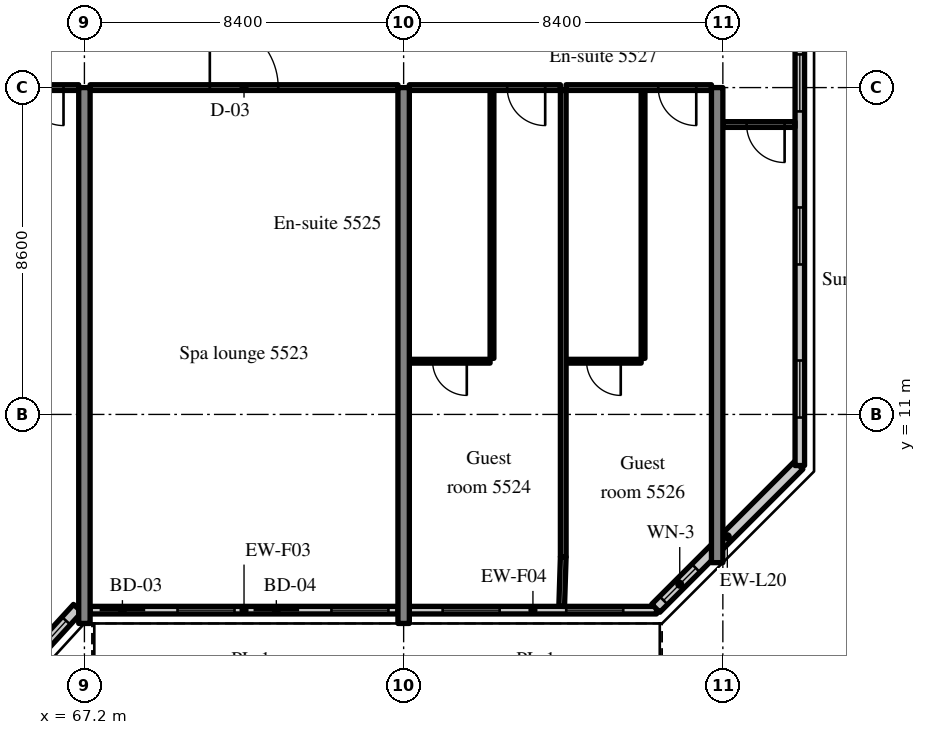
"""IFC4 building model, lengths in metres.
Left out: names, types, materials, properties, quantities, classifications, styles, units other than length and angle.
Written with IfcOpenShell. Run it as: python <this file> out.ifc"""

import sys

from ifc_helpers import new_model, si_unit, direction, frame, frame_2d, origin, place, context, subcontext, project, spatial, rectangle, extrude, source, transform, mapped, element, fill, save


model = new_model("IFC4")
c1 = context("Model", 3, precision=1e-05, world=origin(), true_north=direction((0.0, 1.0)))
c2 = subcontext(c1, "Body", "Model", "MODEL_VIEW")
j1 = project(units=[si_unit("LENGTHUNIT", "METRE"), si_unit("PLANEANGLEUNIT", "RADIAN")], contexts=[c1])
p1 = place(None, origin())
s1 = spatial("IfcSite", under=j1, at=p1, CompositionType="ELEMENT")
p2 = place(p1, origin())
s2 = spatial("IfcBuilding", under=s1, at=p2, CompositionType="ELEMENT")
p3 = place(p2, frame((0.0, 0.0, 229.6)))
s3 = spatial("IfcBuildingStorey", under=s2, at=p3, CompositionType="ELEMENT", Elevation=229.6)
m1 = source(origin(), c2, "Body", "SweptSolid", [
    extrude(rectangle(XDim=14.1, YDim=0.3, at=frame_2d((7.05, 0.0))), origin(), (0.0, 0.0, 1.0), 3.62),
])
for number, where, z_axis, x_axis in (
    (1, (67.2, 5.5, 0.0), (0.0, 0.0, 1.0), (0.0, 1.0, 0.0)),
    (2, (75.6, 5.5, 0.0), (0.0, 0.0, 1.0), (0.0, 1.0, 0.0)),
):
    element("IfcWall", number, at=place(p3, frame(where, z_axis=z_axis, x_axis=x_axis)), inside=s3, PredefinedType="SHEAR", context=c2, shape_type="MappedRepresentation", body=[
        mapped(m1, transform((0.0, 0.0, 0.0), scale=1.0)),
    ])
m2 = source(origin(), c2, "Body", "SweptSolid", [
    extrude(rectangle(XDim=12.5, YDim=0.3, at=frame_2d((6.25, 0.0))), origin(), (0.0, 0.0, 1.0), 3.62),
])
p4 = place(p3, frame((83.85, 7.1, 0.0), z_axis=(0.0, 0.0, 1.0), x_axis=(0.0, 1.0, 0.0)))
e3 = element("IfcWall", 3, at=p4, inside=s3, PredefinedType="SHEAR", context=c2, shape_type="MappedRepresentation", body=[
    mapped(m2, transform((0.0, 0.0, 0.0), scale=1.0)),
])
m3 = source(origin(), c2, "Body", "SweptSolid", [
    extrude(rectangle(XDim=2.398, YDim=0.3, at=frame_2d((1.199, 0.0))), origin(), (0.0, 0.0, 1.0), 3.62),
])
p5 = place(p3, frame((65.404, 4.131, 0.0), z_axis=(0.0, 0.0, 1.0), x_axis=(0.675374189419, 0.737475222815, 0.0)))
e4 = element("IfcWall", 4, at=p5, inside=s3, PredefinedType="SOLIDWALL", context=c2, shape_type="MappedRepresentation", body=[
    mapped(m3, transform((0.0, 0.0, 0.0), scale=1.0)),
])
m4 = source(origin(), c2, "Body", "SweptSolid", [
    extrude(rectangle(XDim=1.5, YDim=2.0, at=frame_2d((0.75, 1.0))), frame((0.0, 0.16, 0.0), z_axis=(0.0, -1.0, 0.0), x_axis=(1.0, 0.0, 0.0)), (0.0, 0.0, 1.0), 0.32),
])
p6 = place(p5, frame((0.449, 0.0, 0.9)))
e5 = element("IfcOpeningElement", 5, at=p6, cuts=e4, PredefinedType="OPENING", context=c2, shape_type="MappedRepresentation", body=[
    mapped(m4, transform((0.0, 0.0, 0.0), scale=1.0)),
])
m5 = source(origin(), c2, "Body", "SweptSolid", [
    extrude(rectangle(XDim=8.1, YDim=0.2, at=frame_2d((4.05, 0.0))), origin(), (0.0, 0.0, 1.0), 3.02),
])
p7 = place(p3, frame((67.35, 5.85, 0.0), z_axis=(0.0, 0.0, 1.0), x_axis=(1.0, 0.0, 0.0)))
e6 = element("IfcWall", 6, at=p7, inside=s3, PredefinedType="SOLIDWALL", context=c2, shape_type="MappedRepresentation", body=[
    mapped(m5, transform((0.0, 0.0, 0.0), scale=1.0)),
])
m6 = source(origin(), c2, "Body", "SweptSolid", [
    extrude(rectangle(XDim=1.2, YDim=2.4, at=frame_2d((0.6, 1.2))), frame((0.0, 0.11, 0.0), z_axis=(0.0, -1.0, 0.0), x_axis=(1.0, 0.0, 0.0)), (0.0, 0.0, 1.0), 0.22),
])
p8 = place(p7, frame((0.25, 0.0, 0.0)))
e7 = element("IfcOpeningElement", 7, at=p8, cuts=e6, PredefinedType="OPENING", context=c2, shape_type="MappedRepresentation", body=[
    mapped(m6, transform((0.0, 0.0, 0.0), scale=1.0)),
])
m7 = source(origin(), c2, "Body", "SweptSolid", [
    extrude(rectangle(XDim=1.5, YDim=1.5, at=frame_2d((0.75, 0.75))), frame((0.0, 0.11, 0.0), z_axis=(0.0, -1.0, 0.0), x_axis=(1.0, 0.0, 0.0)), (0.0, 0.0, 1.0), 0.22),
])
p9 = place(p7, frame((2.3, 0.0, 0.9)))
e8 = element("IfcOpeningElement", 8, at=p9, cuts=e6, PredefinedType="OPENING", context=c2, shape_type="MappedRepresentation", body=[
    mapped(m7, transform((0.0, 0.0, 0.0), scale=1.0)),
])
p10 = place(p7, frame((4.3, 0.0, 0.0)))
e9 = element("IfcOpeningElement", 9, at=p10, cuts=e6, PredefinedType="OPENING", context=c2, shape_type="MappedRepresentation", body=[
    mapped(m6, transform((0.0, 0.0, 0.0), scale=1.0)),
])
p11 = place(p7, frame((6.35, 0.0, 0.9)))
e10 = element("IfcOpeningElement", 10, at=p11, cuts=e6, PredefinedType="OPENING", context=c2, shape_type="MappedRepresentation", body=[
    mapped(m7, transform((0.0, 0.0, 0.0), scale=1.0)),
])
m8 = source(origin(), c2, "Body", "SweptSolid", [
    extrude(rectangle(XDim=6.505, YDim=0.2, at=frame_2d((3.252, 0.0))), origin(), (0.0, 0.0, 1.0), 3.02),
])
p12 = place(p3, frame((75.75, 5.85, 0.0), z_axis=(0.0, 0.0, 1.0), x_axis=(1.0, 0.0, 0.0)))
e11 = element("IfcWall", 11, at=p12, inside=s3, PredefinedType="SOLIDWALL", context=c2, shape_type="MappedRepresentation", body=[
    mapped(m8, transform((0.0, 0.0, 0.0), scale=1.0)),
])
p13 = place(p12, frame((0.876, 0.0, 0.9)))
e12 = element("IfcOpeningElement", 12, at=p13, cuts=e11, PredefinedType="OPENING", context=c2, shape_type="MappedRepresentation", body=[
    mapped(m7, transform((0.0, 0.0, 0.0), scale=1.0)),
])
p14 = place(p12, frame((4.129, 0.0, 0.9)))
e13 = element("IfcOpeningElement", 13, at=p14, cuts=e11, PredefinedType="OPENING", context=c2, shape_type="MappedRepresentation", body=[
    mapped(m7, transform((0.0, 0.0, 0.0), scale=1.0)),
])
m9 = source(origin(), c2, "Body", "SweptSolid", [
    extrude(rectangle(XDim=5.326, YDim=0.3, at=frame_2d((2.663, 0.0))), origin(), (0.0, 0.0, 1.0), 3.62),
])
p15 = place(p3, frame((82.234, 5.9, 0.0), z_axis=(0.0, 0.0, 1.0), x_axis=(0.707083859269, 0.707129702361, 0.0)))
e14 = element("IfcWall", 14, at=p15, inside=s3, PredefinedType="SOLIDWALL", context=c2, shape_type="MappedRepresentation", body=[
    mapped(m9, transform((0.0, 0.0, 0.0), scale=1.0)),
])
m10 = source(origin(), c2, "Body", "SweptSolid", [
    extrude(rectangle(XDim=1.2, YDim=1.5, at=frame_2d((0.6, 0.75))), frame((0.0, 0.16, 0.0), z_axis=(0.0, -1.0, 0.0), x_axis=(1.0, 0.0, 0.0)), (0.0, 0.0, 1.0), 0.32),
])
p16 = place(p15, frame((0.292, 0.0, 0.9)))
e15 = element("IfcOpeningElement", 15, at=p16, cuts=e14, PredefinedType="OPENING", context=c2, shape_type="MappedRepresentation", body=[
    mapped(m10, transform((0.0, 0.0, 0.0), scale=1.0)),
])
m11 = source(origin(), c2, "Body", "SweptSolid", [
    extrude(rectangle(XDim=28.189, YDim=0.25, at=frame_2d((14.095, 0.0))), origin(), (0.0, 0.0, 1.0), 3.62),
])
p17 = place(p3, frame((86.025, 9.655, 0.0), z_axis=(0.0, 0.0, 1.0), x_axis=(0.0, 1.0, 0.0)))
e16 = element("IfcWall", 16, at=p17, inside=s3, PredefinedType="SOLIDWALL", context=c2, shape_type="MappedRepresentation", body=[
    mapped(m11, transform((0.0, 0.0, 0.0), scale=1.0)),
])
m12 = source(origin(), c2, "Body", "SweptSolid", [
    extrude(rectangle(XDim=1.5, YDim=1.5, at=frame_2d((0.75, 0.75))), frame((0.0, 0.135, 0.0), z_axis=(0.0, -1.0, 0.0), x_axis=(1.0, 0.0, 0.0)), (0.0, 0.0, 1.0), 0.27),
])
p18 = place(p17, frame((1.263, 0.0, 0.9)))
e17 = element("IfcOpeningElement", 17, at=p18, cuts=e16, PredefinedType="OPENING", context=c2, shape_type="MappedRepresentation", body=[
    mapped(m12, transform((0.0, 0.0, 0.0), scale=1.0)),
])
p19 = place(p17, frame((5.291, 0.0, 0.9)))
e18 = element("IfcOpeningElement", 18, at=p19, cuts=e16, PredefinedType="OPENING", context=c2, shape_type="MappedRepresentation", body=[
    mapped(m12, transform((0.0, 0.0, 0.0), scale=1.0)),
])
p20 = place(p17, frame((9.318, 0.0, 0.9)))
e19 = element("IfcOpeningElement", 19, at=p20, cuts=e16, PredefinedType="OPENING", context=c2, shape_type="MappedRepresentation", body=[
    mapped(m12, transform((0.0, 0.0, 0.0), scale=1.0)),
])
p21 = place(p17, frame((13.345, 0.0, 0.9)))
e20 = element("IfcOpeningElement", 20, at=p21, cuts=e16, PredefinedType="OPENING", context=c2, shape_type="MappedRepresentation", body=[
    mapped(m12, transform((0.0, 0.0, 0.0), scale=1.0)),
])
p22 = place(p17, frame((17.372, 0.0, 0.9)))
e21 = element("IfcOpeningElement", 21, at=p22, cuts=e16, PredefinedType="OPENING", context=c2, shape_type="MappedRepresentation", body=[
    mapped(m12, transform((0.0, 0.0, 0.0), scale=1.0)),
])
p23 = place(p17, frame((21.399, 0.0, 0.9)))
e22 = element("IfcOpeningElement", 22, at=p23, cuts=e16, PredefinedType="OPENING", context=c2, shape_type="MappedRepresentation", body=[
    mapped(m12, transform((0.0, 0.0, 0.0), scale=1.0)),
])
p24 = place(p17, frame((25.426, 0.0, 0.9)))
e23 = element("IfcOpeningElement", 23, at=p24, cuts=e16, PredefinedType="OPENING", context=c2, shape_type="MappedRepresentation", body=[
    mapped(m12, transform((0.0, 0.0, 0.0), scale=1.0)),
])
m13 = source(origin(), c2, "Body", "SweptSolid", [
    extrude(rectangle(XDim=8.1, YDim=0.15, at=frame_2d((4.05, 0.0))), origin(), (0.0, 0.0, 1.0), 2.92),
])
p25 = place(p3, frame((58.95, 19.6, 0.0), z_axis=(0.0, 0.0, 1.0), x_axis=(1.0, 0.0, 0.0)))
e24 = element("IfcWall", 24, at=p25, inside=s3, PredefinedType="PARTITIONING", context=c2, shape_type="MappedRepresentation", body=[
    mapped(m13, transform((0.0, 0.0, 0.0), scale=1.0)),
])
m14 = source(origin(), c2, "Body", "SweptSolid", [
    extrude(rectangle(XDim=1.0, YDim=2.1, at=frame_2d((0.5, 1.05))), frame((0.0, 0.085, 0.0), z_axis=(0.0, -1.0, 0.0), x_axis=(1.0, 0.0, 0.0)), (0.0, 0.0, 1.0), 0.17),
])
p26 = place(p25, frame((6.7, 0.0, 0.0)))
e25 = element("IfcOpeningElement", 25, at=p26, cuts=e24, PredefinedType="OPENING", context=c2, shape_type="MappedRepresentation", body=[
    mapped(m14, transform((0.0, 0.0, 0.0), scale=1.0)),
])
m15 = source(origin(), c2, "Body", "SweptSolid", [
    extrude(rectangle(XDim=8.1, YDim=0.15, at=frame_2d((4.05, 0.0))), origin(), (0.0, 0.0, 1.0), 2.92),
])
p27 = place(p3, frame((67.35, 19.6, 0.0), z_axis=(0.0, 0.0, 1.0), x_axis=(1.0, 0.0, 0.0)))
e26 = element("IfcWall", 26, at=p27, inside=s3, PredefinedType="PARTITIONING", context=c2, shape_type="MappedRepresentation", body=[
    mapped(m15, transform((0.0, 0.0, 0.0), scale=1.0)),
])
m16 = source(origin(), c2, "Body", "SweptSolid", [
    extrude(rectangle(XDim=1.8, YDim=2.1, at=frame_2d((0.9, 1.05))), frame((0.0, 0.085, 0.0), z_axis=(0.0, -1.0, 0.0), x_axis=(1.0, 0.0, 0.0)), (0.0, 0.0, 1.0), 0.17),
])
p28 = place(p27, frame((3.15, 0.0, 0.0)))
e27 = element("IfcOpeningElement", 27, at=p28, cuts=e26, PredefinedType="OPENING", context=c2, shape_type="MappedRepresentation", body=[
    mapped(m16, transform((0.0, 0.0, 0.0), scale=1.0)),
])
m17 = source(origin(), c2, "Body", "SweptSolid", [
    extrude(rectangle(XDim=7.05, YDim=0.1, at=frame_2d((3.525, 0.0))), origin(), (0.0, 0.0, 1.0), 3.62),
])
p29 = place(p3, frame((77.925, 12.475, 0.0), z_axis=(0.0, 0.0, 1.0), x_axis=(0.0, 1.0, 0.0)))
e28 = element("IfcWall", 28, at=p29, inside=s3, PredefinedType="PARTITIONING", context=c2, shape_type="MappedRepresentation", body=[
    mapped(m17, transform((0.0, 0.0, 0.0), scale=1.0)),
])
m18 = source(origin(), c2, "Body", "SweptSolid", [
    extrude(rectangle(XDim=2.125, YDim=0.1, at=frame_2d((1.062, 0.0))), origin(), (0.0, 0.0, 1.0), 3.62),
])
p30 = place(p3, frame((75.75, 12.4, 0.0), z_axis=(0.0, 0.0, 1.0), x_axis=(1.0, 0.0, 0.0)))
e29 = element("IfcWall", 29, at=p30, inside=s3, PredefinedType="PARTITIONING", context=c2, shape_type="MappedRepresentation", body=[
    mapped(m18, transform((0.0, 0.0, 0.0), scale=1.0)),
])
m19 = source(origin(), c2, "Body", "SweptSolid", [
    extrude(rectangle(XDim=0.9, YDim=2.1, at=frame_2d((0.45, 1.05))), frame((0.0, 0.06, 0.0), z_axis=(0.0, -1.0, 0.0), x_axis=(1.0, 0.0, 0.0)), (0.0, 0.0, 1.0), 0.12),
])
p31 = place(p30, frame((0.612, 0.0, 0.0)))
e30 = element("IfcOpeningElement", 30, at=p31, cuts=e29, PredefinedType="OPENING", context=c2, shape_type="MappedRepresentation", body=[
    mapped(m19, transform((0.0, 0.0, 0.0), scale=1.0)),
])
m20 = source(origin(), c2, "Body", "SweptSolid", [
    extrude(rectangle(XDim=3.975, YDim=0.15, at=frame_2d((1.988, 0.0))), origin(), (0.0, 0.0, 1.0), 2.92),
])
p32 = place(p3, frame((75.75, 19.6, 0.0), z_axis=(0.0, 0.0, 1.0), x_axis=(1.0, 0.0, 0.0)))
e31 = element("IfcWall", 31, at=p32, inside=s3, PredefinedType="PARTITIONING", context=c2, shape_type="MappedRepresentation", body=[
    mapped(m20, transform((0.0, 0.0, 0.0), scale=1.0)),
])
p33 = place(p32, frame((2.575, 0.0, 0.0)))
e32 = element("IfcOpeningElement", 32, at=p33, cuts=e31, PredefinedType="OPENING", context=c2, shape_type="MappedRepresentation", body=[
    mapped(m14, transform((0.0, 0.0, 0.0), scale=1.0)),
])
p34 = place(p3, frame((81.9, 12.475, 0.0), z_axis=(0.0, 0.0, 1.0), x_axis=(0.0, 1.0, 0.0)))
e33 = element("IfcWall", 33, at=p34, inside=s3, PredefinedType="PARTITIONING", context=c2, shape_type="MappedRepresentation", body=[
    mapped(m17, transform((0.0, 0.0, 0.0), scale=1.0)),
])
m21 = source(origin(), c2, "Body", "SweptSolid", [
    extrude(rectangle(XDim=1.975, YDim=0.1, at=frame_2d((0.988, 0.0))), origin(), (0.0, 0.0, 1.0), 3.62),
])
p35 = place(p3, frame((79.875, 12.4, 0.0), z_axis=(0.0, 0.0, 1.0), x_axis=(1.0, 0.0, 0.0)))
e34 = element("IfcWall", 34, at=p35, inside=s3, PredefinedType="PARTITIONING", context=c2, shape_type="MappedRepresentation", body=[
    mapped(m21, transform((0.0, 0.0, 0.0), scale=1.0)),
])
p36 = place(p35, frame((0.538, 0.0, 0.0)))
e35 = element("IfcOpeningElement", 35, at=p36, cuts=e34, PredefinedType="OPENING", context=c2, shape_type="MappedRepresentation", body=[
    mapped(m19, transform((0.0, 0.0, 0.0), scale=1.0)),
])
m22 = source(origin(), c2, "Body", "SweptSolid", [
    extrude(rectangle(XDim=3.825, YDim=0.15, at=frame_2d((1.913, 0.0))), origin(), (0.0, 0.0, 1.0), 2.92),
])
p37 = place(p3, frame((79.875, 19.6, 0.0), z_axis=(0.0, 0.0, 1.0), x_axis=(1.0, 0.0, 0.0)))
e36 = element("IfcWall", 36, at=p37, inside=s3, PredefinedType="PARTITIONING", context=c2, shape_type="MappedRepresentation", body=[
    mapped(m22, transform((0.0, 0.0, 0.0), scale=1.0)),
])
p38 = place(p37, frame((2.425, 0.0, 0.0)))
e37 = element("IfcOpeningElement", 37, at=p38, cuts=e36, PredefinedType="OPENING", context=c2, shape_type="MappedRepresentation", body=[
    mapped(m14, transform((0.0, 0.0, 0.0), scale=1.0)),
])
m23 = source(origin(), c2, "Body", "SweptSolid", [
    extrude(rectangle(XDim=12.275, YDim=0.15, at=frame_2d((6.137, 0.0))), origin(), (0.0, 0.0, 1.0), 3.62),
])
p39 = place(p3, frame((79.8, 7.25, 0.0), z_axis=(0.0, 0.0, 1.0), x_axis=(0.0, 1.0, 0.0)))
e38 = element("IfcWall", 38, at=p39, inside=s3, PredefinedType="PARTITIONING", context=c2, shape_type="MappedRepresentation", body=[
    mapped(m23, transform((0.0, 0.0, 0.0), scale=1.0)),
])
m24 = source(origin(), c2, "Body", "SweptSolid", [
    extrude(rectangle(XDim=1.9, YDim=0.15, at=frame_2d((0.95, 0.0))), origin(), (0.0, 0.0, 1.0), 2.92),
])
p40 = place(p3, frame((84.0, 18.628, 0.0), z_axis=(0.0, 0.0, 1.0), x_axis=(1.0, 0.0, 0.0)))
e39 = element("IfcWall", 39, at=p40, inside=s3, PredefinedType="PARTITIONING", context=c2, shape_type="MappedRepresentation", body=[
    mapped(m24, transform((0.0, 0.0, 0.0), scale=1.0)),
])
p41 = place(p40, frame((0.625, 0.0, 0.0)))
e40 = element("IfcOpeningElement", 40, at=p41, cuts=e39, PredefinedType="OPENING", context=c2, shape_type="MappedRepresentation", body=[
    mapped(m14, transform((0.0, 0.0, 0.0), scale=1.0)),
])
m25 = source(origin(), c2, "Body", "SweptSolid", [
    extrude(rectangle(XDim=1.301, YDim=0.15, at=frame_2d((0.65, 0.0))), origin(), (0.0, 0.0, 1.0), 3.62),
])
p42 = place(p3, frame((79.759, 5.95, 0.0), z_axis=(0.0, 0.0, 1.0), x_axis=(0.031533606063, 0.999502692187, 0.0)))
e41 = element("IfcWall", 41, at=p42, inside=s3, PredefinedType="PARTITIONING", context=c2, shape_type="MappedRepresentation", body=[
    mapped(m25, transform((0.0, 0.0, 0.0), scale=1.0)),
])
m26 = source(origin(), c2, "Body", "SweptSolid", [
    extrude(rectangle(XDim=1.5, YDim=2.0, at=frame_2d((0.75, 1.0))), frame((0.0, 0.03, 0.0), z_axis=(0.0, -1.0, 0.0), x_axis=(1.0, 0.0, 0.0)), (0.0, 0.0, 1.0), 0.06),
])
p43 = place(p6, origin())
e42 = element("IfcWindow", 42, at=p43, inside=s3, PartitioningType="SINGLE_PANEL", PredefinedType="WINDOW", context=c2, shape_type="MappedRepresentation", body=[
    mapped(m26, transform((0.0, 0.0, 0.0), scale=1.0)),
])
fill(e5, e42)
m27 = source(origin(), c2, "Body", "SweptSolid", [
    extrude(rectangle(XDim=1.2, YDim=2.4, at=frame_2d((0.6, 1.2))), frame((0.0, 0.025, 0.0), z_axis=(0.0, -1.0, 0.0), x_axis=(1.0, 0.0, 0.0)), (0.0, 0.0, 1.0), 0.05),
])
p44 = place(p8, origin())
e43 = element("IfcDoor", 43, at=p44, inside=s3, OperationType="SLIDING_TO_LEFT", PredefinedType="DOOR", context=c2, shape_type="MappedRepresentation", body=[
    mapped(m27, transform((0.0, 0.0, 0.0), scale=1.0)),
])
fill(e7, e43)
m28 = source(origin(), c2, "Body", "SweptSolid", [
    extrude(rectangle(XDim=1.5, YDim=1.5, at=frame_2d((0.75, 0.75))), frame((0.0, 0.03, 0.0), z_axis=(0.0, -1.0, 0.0), x_axis=(1.0, 0.0, 0.0)), (0.0, 0.0, 1.0), 0.06),
])
p45 = place(p9, origin())
e44 = element("IfcWindow", 44, at=p45, inside=s3, PartitioningType="SINGLE_PANEL", PredefinedType="WINDOW", context=c2, shape_type="MappedRepresentation", body=[
    mapped(m28, transform((0.0, 0.0, 0.0), scale=1.0)),
])
fill(e8, e44)
p46 = place(p10, origin())
e45 = element("IfcDoor", 45, at=p46, inside=s3, OperationType="SLIDING_TO_RIGHT", PredefinedType="DOOR", context=c2, shape_type="MappedRepresentation", body=[
    mapped(m27, transform((0.0, 0.0, 0.0), scale=1.0)),
])
fill(e9, e45)
p47 = place(p11, origin())
e46 = element("IfcWindow", 46, at=p47, inside=s3, PartitioningType="SINGLE_PANEL", PredefinedType="WINDOW", context=c2, shape_type="MappedRepresentation", body=[
    mapped(m28, transform((0.0, 0.0, 0.0), scale=1.0)),
])
fill(e10, e46)
p48 = place(p13, origin())
e47 = element("IfcWindow", 47, at=p48, inside=s3, PartitioningType="SINGLE_PANEL", PredefinedType="WINDOW", context=c2, shape_type="MappedRepresentation", body=[
    mapped(m28, transform((0.0, 0.0, 0.0), scale=1.0)),
])
fill(e12, e47)
p49 = place(p14, origin())
e48 = element("IfcWindow", 48, at=p49, inside=s3, PartitioningType="SINGLE_PANEL", PredefinedType="WINDOW", context=c2, shape_type="MappedRepresentation", body=[
    mapped(m28, transform((0.0, 0.0, 0.0), scale=1.0)),
])
fill(e13, e48)
m29 = source(origin(), c2, "Body", "SweptSolid", [
    extrude(rectangle(XDim=1.2, YDim=1.5, at=frame_2d((0.6, 0.75))), frame((0.0, 0.03, 0.0), z_axis=(0.0, -1.0, 0.0), x_axis=(1.0, 0.0, 0.0)), (0.0, 0.0, 1.0), 0.06),
])
p50 = place(p16, origin())
e49 = element("IfcWindow", 49, at=p50, inside=s3, PartitioningType="SINGLE_PANEL", PredefinedType="WINDOW", context=c2, shape_type="MappedRepresentation", body=[
    mapped(m29, transform((0.0, 0.0, 0.0), scale=1.0)),
])
fill(e15, e49)
p51 = place(p18, origin())
e50 = element("IfcWindow", 50, at=p51, inside=s3, PartitioningType="SINGLE_PANEL", PredefinedType="WINDOW", context=c2, shape_type="MappedRepresentation", body=[
    mapped(m28, transform((0.0, 0.0, 0.0), scale=1.0)),
])
fill(e17, e50)
p52 = place(p19, origin())
e51 = element("IfcWindow", 51, at=p52, inside=s3, PartitioningType="SINGLE_PANEL", PredefinedType="WINDOW", context=c2, shape_type="MappedRepresentation", body=[
    mapped(m28, transform((0.0, 0.0, 0.0), scale=1.0)),
])
fill(e18, e51)
p53 = place(p20, origin())
e52 = element("IfcWindow", 52, at=p53, inside=s3, PartitioningType="SINGLE_PANEL", PredefinedType="WINDOW", context=c2, shape_type="MappedRepresentation", body=[
    mapped(m28, transform((0.0, 0.0, 0.0), scale=1.0)),
])
fill(e19, e52)
m30 = source(origin(), c2, "Body", "SweptSolid", [
    extrude(rectangle(XDim=1.0, YDim=2.1, at=frame_2d((0.5, 1.05))), frame((0.0, 0.025, 0.0), z_axis=(0.0, -1.0, 0.0), x_axis=(1.0, 0.0, 0.0)), (0.0, 0.0, 1.0), 0.05),
])
p54 = place(p26, origin())
e53 = element("IfcDoor", 53, at=p54, inside=s3, OperationType="SINGLE_SWING_RIGHT", PredefinedType="DOOR", context=c2, shape_type="MappedRepresentation", body=[
    mapped(m30, transform((0.0, 0.0, 0.0), scale=1.0)),
])
fill(e25, e53)
m31 = source(origin(), c2, "Body", "SweptSolid", [
    extrude(rectangle(XDim=1.8, YDim=2.1, at=frame_2d((0.9, 1.05))), frame((0.0, 0.025, 0.0), z_axis=(0.0, -1.0, 0.0), x_axis=(1.0, 0.0, 0.0)), (0.0, 0.0, 1.0), 0.05),
])
p55 = place(p28, origin())
e54 = element("IfcDoor", 54, at=p55, inside=s3, OperationType="DOUBLE_DOOR_SINGLE_SWING", PredefinedType="DOOR", context=c2, shape_type="MappedRepresentation", body=[
    mapped(m31, transform((0.0, 0.0, 0.0), scale=1.0)),
])
fill(e27, e54)
m32 = source(origin(), c2, "Body", "SweptSolid", [
    extrude(rectangle(XDim=0.9, YDim=2.1, at=frame_2d((0.45, 1.05))), frame((0.0, 0.025, 0.0), z_axis=(0.0, -1.0, 0.0), x_axis=(1.0, 0.0, 0.0)), (0.0, 0.0, 1.0), 0.05),
])
p56 = place(p31, origin())
e55 = element("IfcDoor", 55, at=p56, inside=s3, OperationType="SINGLE_SWING_RIGHT", PredefinedType="DOOR", context=c2, shape_type="MappedRepresentation", body=[
    mapped(m32, transform((0.0, 0.0, 0.0), scale=1.0)),
])
fill(e30, e55)
p57 = place(p33, origin())
e56 = element("IfcDoor", 56, at=p57, inside=s3, OperationType="SINGLE_SWING_RIGHT", PredefinedType="DOOR", context=c2, shape_type="MappedRepresentation", body=[
    mapped(m30, transform((0.0, 0.0, 0.0), scale=1.0)),
])
fill(e32, e56)
p58 = place(p36, origin())
e57 = element("IfcDoor", 57, at=p58, inside=s3, OperationType="SINGLE_SWING_RIGHT", PredefinedType="DOOR", context=c2, shape_type="MappedRepresentation", body=[
    mapped(m32, transform((0.0, 0.0, 0.0), scale=1.0)),
])
fill(e35, e57)
p59 = place(p38, origin())
e58 = element("IfcDoor", 58, at=p59, inside=s3, OperationType="SINGLE_SWING_RIGHT", PredefinedType="DOOR", context=c2, shape_type="MappedRepresentation", body=[
    mapped(m30, transform((0.0, 0.0, 0.0), scale=1.0)),
])
fill(e37, e58)
p60 = place(p41, origin())
e59 = element("IfcDoor", 59, at=p60, inside=s3, OperationType="SINGLE_SWING_RIGHT", PredefinedType="DOOR", context=c2, shape_type="MappedRepresentation", body=[
    mapped(m30, transform((0.0, 0.0, 0.0), scale=1.0)),
])
fill(e40, e59)
save(model, sys.argv[1])
